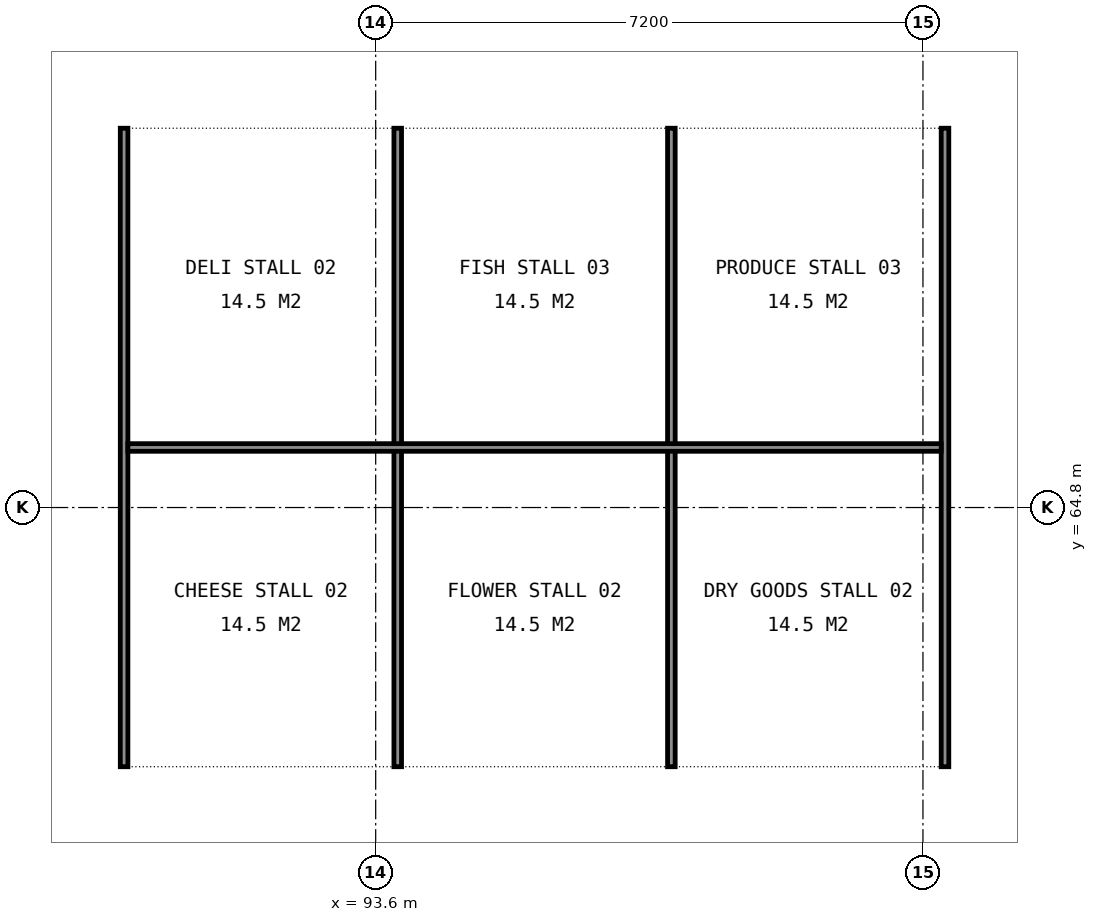
"""IFC4 building model, lengths in metres.
Left out: names, types, materials, properties, quantities, classifications, styles, units other than length and angle.
Written with IfcOpenShell. Run it as: python <this file> out.ifc"""

import sys

from ifc_helpers import new_model, si_unit, direction, frame, frame_2d, origin, place, context, subcontext, project, spatial, rectangle, extrude, element, save


model = new_model("IFC4")
c1 = context("Model", 3, precision=1e-05, world=origin(), true_north=direction((0.0, 1.0)))
c2 = subcontext(c1, "Body", "Model", "MODEL_VIEW")
j1 = project(units=[si_unit("LENGTHUNIT", "METRE"), si_unit("PLANEANGLEUNIT", "RADIAN")], contexts=[c1])
p1 = place(None, origin())
s1 = spatial("IfcSite", under=j1, at=p1, CompositionType="ELEMENT")
p2 = place(p1, origin())
s2 = spatial("IfcBuilding", under=s1, at=p2, CompositionType="ELEMENT")
p3 = place(p2, origin())
s3 = spatial("IfcBuildingStorey", under=s2, at=p3, CompositionType="ELEMENT", Elevation=0.0)
for number, where, z_axis, x_axis in (
    (1, (90.29, 61.39, 0.0), (0.0, 0.0, 1.0), (0.0, 1.0, 0.0)),
    (2, (93.89, 61.39, 0.0), (0.0, 0.0, 1.0), (0.0, 1.0, 0.0)),
    (3, (97.49, 61.39, 0.0), (0.0, 0.0, 1.0), (0.0, 1.0, 0.0)),
    (4, (101.09, 61.39, 0.0), (0.0, 0.0, 1.0), (0.0, 1.0, 0.0)),
):
    element("IfcWall", number, at=place(p3, frame(where, z_axis=z_axis, x_axis=x_axis)), inside=s3, PredefinedType="PARTITIONING", context=c2, shape_type="SweptSolid", body=[
        extrude(rectangle(XDim=8.4, YDim=0.1, at=frame_2d((4.2, 0.0))), origin(), (0.0, 0.0, 1.0), 1.2),
    ])
p4 = place(p3, frame((90.34, 65.59, 0.0), z_axis=(0.0, 0.0, 1.0), x_axis=(1.0, 0.0, 0.0)))
e5 = element("IfcWall", 5, at=p4, inside=s3, PredefinedType="PARTITIONING", context=c2, shape_type="SweptSolid", body=[
    extrude(rectangle(XDim=10.7, YDim=0.1, at=frame_2d((5.35, 0.0))), origin(), (0.0, 0.0, 1.0), 1.2),
])
save(model, sys.argv[1])
